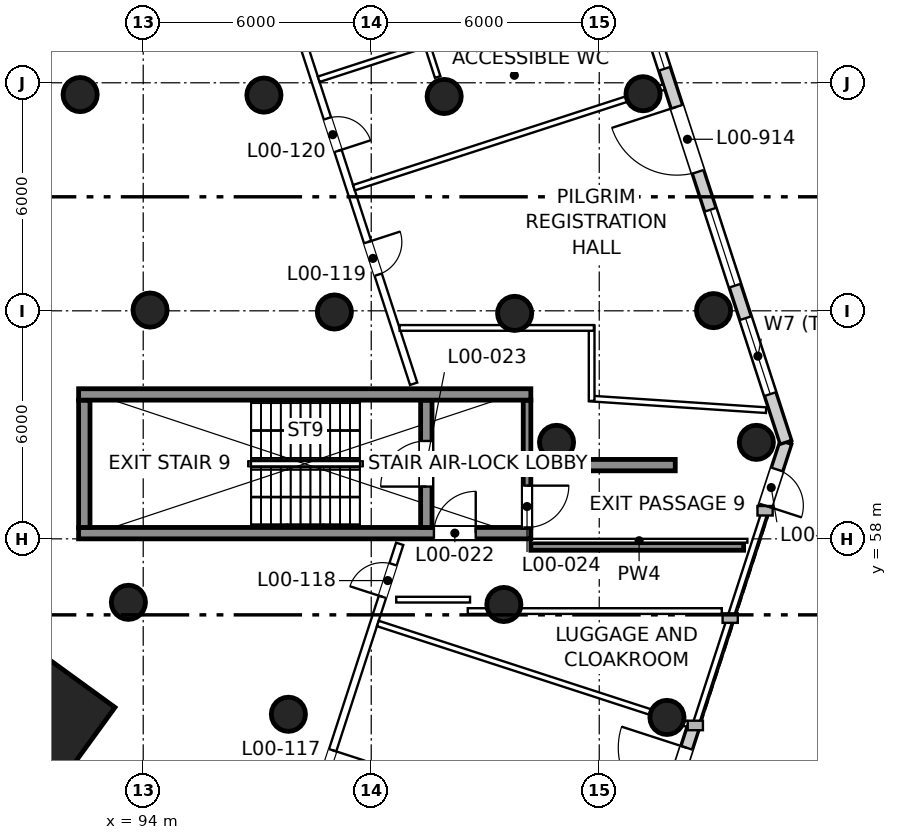
"""IFC4 building model, lengths in metres.
Left out: names, types, materials, properties, quantities, classifications, styles, units other than length and angle.
Written with IfcOpenShell. Run it as: python <this file> out.ifc"""

import sys

from ifc_helpers import new_model, si_unit, direction, frame, frame_2d, origin, origin_2d, place, context, subcontext, project, spatial, rectangle, circle, extrude, element, fill, save


model = new_model("IFC4")
c1 = context("Model", 3, precision=1e-05, world=origin(), true_north=direction((0.0, 1.0)))
c2 = subcontext(c1, "Body", "Model", "MODEL_VIEW")
j1 = project(units=[si_unit("LENGTHUNIT", "METRE"), si_unit("PLANEANGLEUNIT", "RADIAN")], contexts=[c1])
p1 = place(None, origin())
s1 = spatial("IfcSite", under=j1, at=p1, CompositionType="ELEMENT")
p2 = place(p1, origin())
s2 = spatial("IfcBuilding", under=s1, at=p2, CompositionType="ELEMENT")
p3 = place(p2, origin())
s3 = spatial("IfcBuildingStorey", under=s2, at=p3, CompositionType="ELEMENT", Elevation=0.0)
p4 = place(p3, frame((91.58, 53.3, 0.0), z_axis=(0.0, 0.0, 1.0), x_axis=(0.809016994375, -0.587785252292, 0.0)))
e1 = element("IfcColumn", 1, at=p4, inside=s3, PredefinedType="COLUMN", context=c2, shape_type="SweptSolid", body=[
    extrude(rectangle(XDim=2.4, YDim=2.4, at=origin_2d()), origin(), (0.0, 0.0, 1.0), 9.0),
])
for number, where, z_axis, x_axis in (
    (2, (93.61, 56.33, 0.0), (0.0, 0.0, 1.0), (1.0, 0.0, 0.0)),
    (3, (94.18, 64.02, 0.0), (0.0, 0.0, 1.0), (1.0, 0.0, 0.0)),
    (4, (92.34, 69.69, 0.0), (0.0, 0.0, 1.0), (1.0, 0.0, 0.0)),
    (5, (107.782, 53.301, 0.0), (0.0, 0.0, 1.0), (1.0, 0.0, 0.0)),
    (6, (110.134, 60.539, 0.0), (0.0, 0.0, 1.0), (1.0, 0.0, 0.0)),
    (7, (109.008, 64.005, 0.0), (0.0, 0.0, 1.0), (1.0, 0.0, 0.0)),
    (8, (107.153, 69.712, 0.0), (0.0, 0.0, 1.0), (1.0, 0.0, 0.0)),
    (9, (103.49, 56.273, 0.0), (0.0, 0.0, 1.0), (1.0, 0.0, 0.0)),
    (10, (104.876, 60.539, 0.0), (0.0, 0.0, 1.0), (1.0, 0.0, 0.0)),
    (11, (103.774, 63.933, 0.0), (0.0, 0.0, 1.0), (1.0, 0.0, 0.0)),
    (12, (101.919, 69.64, 0.0), (0.0, 0.0, 1.0), (1.0, 0.0, 0.0)),
    (13, (97.82, 53.384, 0.0), (0.0, 0.0, 1.0), (1.0, 0.0, 0.0)),
    (14, (99.03, 63.969, 0.0), (0.0, 0.0, 1.0), (1.0, 0.0, 0.0)),
    (15, (97.176, 69.676, 0.0), (0.0, 0.0, 1.0), (1.0, 0.0, 0.0)),
):
    element("IfcColumn", number, at=place(p3, frame(where, z_axis=z_axis, x_axis=x_axis)), inside=s3, PredefinedType="COLUMN", context=c2, shape_type="SweptSolid", body=[
        extrude(circle(Radius=0.45, at=origin_2d()), origin(), (0.0, 0.0, 1.0), 9.0),
    ])
p5 = place(p3, frame((107.559, 50.219, 0.0), z_axis=(0.0, 0.0, 1.0), x_axis=(0.309065831784, 0.951040646673, 0.0)))
e16 = element("IfcWall", 16, at=p5, inside=s3, PredefinedType="SOLIDWALL", context=c2, shape_type="SweptSolid", body=[
    extrude(rectangle(XDim=3.0, YDim=0.32, at=frame_2d((1.5, 0.0))), origin(), (0.0, 0.0, 1.0), 8.65),
])
p6 = place(p5, frame((0.6, 0.0, 0.0)))
e17 = element("IfcOpeningElement", 17, at=p6, cuts=e16, PredefinedType="OPENING", context=c2, shape_type="SweptSolid", body=[
    extrude(rectangle(XDim=1.8, YDim=2.4, at=frame_2d((0.9, 1.2))), frame((0.0, 0.17, 0.0), z_axis=(0.0, -1.0, 0.0), x_axis=(1.0, 0.0, 0.0)), (0.0, 0.0, 1.0), 0.34),
])
p7 = place(p3, frame((110.34, 58.779, 0.0), z_axis=(0.0, 0.0, 1.0), x_axis=(0.309056246022, 0.951043761766, 0.0)))
e18 = element("IfcWall", 18, at=p7, inside=s3, PredefinedType="SOLIDWALL", context=c2, shape_type="SweptSolid", body=[
    extrude(rectangle(XDim=1.851, YDim=0.32, at=frame_2d((0.925, 0.0))), origin(), (0.0, 0.0, 1.0), 8.65),
])
p8 = place(p7, frame((0.1, 0.0, 0.0)))
e19 = element("IfcOpeningElement", 19, at=p8, cuts=e18, PredefinedType="OPENING", context=c2, shape_type="SweptSolid", body=[
    extrude(rectangle(XDim=1.0, YDim=2.1, at=frame_2d((0.5, 1.05))), frame((0.0, 0.17, 0.0), z_axis=(0.0, -1.0, 0.0), x_axis=(1.0, 0.0, 0.0)), (0.0, 0.0, 1.0), 0.34),
])
p9 = place(p3, frame((110.912, 60.539, 0.0), z_axis=(0.0, 0.0, 1.0), x_axis=(-0.309016476183, 0.951056684666, 0.0)))
e20 = element("IfcWall", 20, at=p9, inside=s3, PredefinedType="SOLIDWALL", context=c2, shape_type="SweptSolid", body=[
    extrude(rectangle(XDim=28.556, YDim=0.32, at=frame_2d((14.278, 0.0))), origin(), (0.0, 0.0, 1.0), 8.65),
])
p10 = place(p9, frame((1.335, 0.0, 0.9)))
e21 = element("IfcOpeningElement", 21, at=p10, cuts=e20, PredefinedType="OPENING", context=c2, shape_type="SweptSolid", body=[
    extrude(rectangle(XDim=2.1, YDim=3.0, at=frame_2d((1.05, 1.5))), frame((0.0, 0.17, 0.0), z_axis=(0.0, -1.0, 0.0), x_axis=(1.0, 0.0, 0.0)), (0.0, 0.0, 1.0), 0.34),
])
p11 = place(p9, frame((4.335, 0.0, 0.9)))
e22 = element("IfcOpeningElement", 22, at=p11, cuts=e20, PredefinedType="OPENING", context=c2, shape_type="SweptSolid", body=[
    extrude(rectangle(XDim=2.1, YDim=3.0, at=frame_2d((1.05, 1.5))), frame((0.0, 0.17, 0.0), z_axis=(0.0, -1.0, 0.0), x_axis=(1.0, 0.0, 0.0)), (0.0, 0.0, 1.0), 0.34),
])
p12 = place(p9, frame((7.485, 0.0, 0.0)))
e23 = element("IfcOpeningElement", 23, at=p12, cuts=e20, PredefinedType="OPENING", context=c2, shape_type="SweptSolid", body=[
    extrude(rectangle(XDim=1.8, YDim=2.4, at=frame_2d((0.9, 1.2))), frame((0.0, 0.17, 0.0), z_axis=(0.0, -1.0, 0.0), x_axis=(1.0, 0.0, 0.0)), (0.0, 0.0, 1.0), 0.34),
])
p13 = place(p9, frame((10.335, 0.0, 0.9)))
e24 = element("IfcOpeningElement", 24, at=p13, cuts=e20, PredefinedType="OPENING", context=c2, shape_type="SweptSolid", body=[
    extrude(rectangle(XDim=2.1, YDim=3.0, at=frame_2d((1.05, 1.5))), frame((0.0, 0.17, 0.0), z_axis=(0.0, -1.0, 0.0), x_axis=(1.0, 0.0, 0.0)), (0.0, 0.0, 1.0), 0.34),
])
p14 = place(p9, frame((13.335, 0.0, 0.9)))
e25 = element("IfcOpeningElement", 25, at=p14, cuts=e20, PredefinedType="OPENING", context=c2, shape_type="SweptSolid", body=[
    extrude(rectangle(XDim=2.1, YDim=3.0, at=frame_2d((1.05, 1.5))), frame((0.0, 0.17, 0.0), z_axis=(0.0, -1.0, 0.0), x_axis=(1.0, 0.0, 0.0)), (0.0, 0.0, 1.0), 0.34),
])
p15 = place(p9, frame((16.335, 0.0, 0.9)))
e26 = element("IfcOpeningElement", 26, at=p15, cuts=e20, PredefinedType="OPENING", context=c2, shape_type="SweptSolid", body=[
    extrude(rectangle(XDim=2.1, YDim=3.0, at=frame_2d((1.05, 1.5))), frame((0.0, 0.17, 0.0), z_axis=(0.0, -1.0, 0.0), x_axis=(1.0, 0.0, 0.0)), (0.0, 0.0, 1.0), 0.34),
])
p16 = place(p9, frame((19.485, 0.0, 0.0)))
e27 = element("IfcOpeningElement", 27, at=p16, cuts=e20, PredefinedType="OPENING", context=c2, shape_type="SweptSolid", body=[
    extrude(rectangle(XDim=1.8, YDim=2.4, at=frame_2d((0.9, 1.2))), frame((0.0, 0.17, 0.0), z_axis=(0.0, -1.0, 0.0), x_axis=(1.0, 0.0, 0.0)), (0.0, 0.0, 1.0), 0.34),
])
p17 = place(p9, frame((22.335, 0.0, 0.9)))
e28 = element("IfcOpeningElement", 28, at=p17, cuts=e20, PredefinedType="OPENING", context=c2, shape_type="SweptSolid", body=[
    extrude(rectangle(XDim=2.1, YDim=3.0, at=frame_2d((1.05, 1.5))), frame((0.0, 0.17, 0.0), z_axis=(0.0, -1.0, 0.0), x_axis=(1.0, 0.0, 0.0)), (0.0, 0.0, 1.0), 0.34),
])
p18 = place(p9, frame((25.335, 0.0, 0.9)))
e29 = element("IfcOpeningElement", 29, at=p18, cuts=e20, PredefinedType="OPENING", context=c2, shape_type="SweptSolid", body=[
    extrude(rectangle(XDim=2.1, YDim=3.0, at=frame_2d((1.05, 1.5))), frame((0.0, 0.17, 0.0), z_axis=(0.0, -1.0, 0.0), x_axis=(1.0, 0.0, 0.0)), (0.0, 0.0, 1.0), 0.34),
])
p19 = place(p3, frame((104.2, 57.8, 0.0), z_axis=(0.0, 0.0, 1.0), x_axis=(1.0, 0.0, 0.0)))
e30 = element("IfcWall", 30, at=p19, inside=s3, PredefinedType="SHEAR", context=c2, shape_type="SweptSolid", body=[
    extrude(rectangle(XDim=5.6, YDim=0.2, at=frame_2d((2.8, 0.0))), origin(), (0.0, 0.0, 1.0), 9.0),
])
p20 = place(p3, frame((104.2, 57.95, 0.0), z_axis=(0.0, 0.0, 1.0), x_axis=(1.0, 0.0, 0.0)))
e31 = element("IfcWall", 31, at=p20, inside=s3, PredefinedType="PARTITIONING", context=c2, shape_type="SweptSolid", body=[
    extrude(rectangle(XDim=5.698, YDim=0.1, at=frame_2d((2.849, 0.0))), origin(), (0.0, 0.0, 1.0), 7.95),
])
p21 = place(p3, frame((92.3, 58.15, 0.0), z_axis=(0.0, 0.0, 1.0), x_axis=(1.0, 0.0, 0.0)))
e32 = element("IfcWall", 32, at=p21, inside=s3, PredefinedType="SHEAR", context=c2, shape_type="SweptSolid", body=[
    extrude(rectangle(XDim=11.9, YDim=0.3, at=frame_2d((5.95, 0.0))), origin(), (0.0, 0.0, 1.0), 9.0),
])
p22 = place(p21, frame((9.35, 0.0, 0.0)))
e33 = element("IfcOpeningElement", 33, at=p22, cuts=e32, PredefinedType="OPENING", context=c2, shape_type="SweptSolid", body=[
    extrude(rectangle(XDim=1.1, YDim=2.1, at=frame_2d((0.55, 1.05))), frame((0.0, 0.16, 0.0), z_axis=(0.0, -1.0, 0.0), x_axis=(1.0, 0.0, 0.0)), (0.0, 0.0, 1.0), 0.32),
])
p23 = place(p3, frame((92.45, 58.3, 0.0), z_axis=(0.0, 0.0, 1.0), x_axis=(0.0, 1.0, 0.0)))
e34 = element("IfcWall", 34, at=p23, inside=s3, PredefinedType="SHEAR", context=c2, shape_type="SweptSolid", body=[
    extrude(rectangle(XDim=3.35, YDim=0.3, at=frame_2d((1.675, 0.0))), origin(), (0.0, 0.0, 1.0), 9.0),
])
p24 = place(p3, frame((101.45, 58.3, 0.0), z_axis=(0.0, 0.0, 1.0), x_axis=(0.0, 1.0, 0.0)))
e35 = element("IfcWall", 35, at=p24, inside=s3, PredefinedType="SHEAR", context=c2, shape_type="SweptSolid", body=[
    extrude(rectangle(XDim=3.35, YDim=0.3, at=frame_2d((1.675, 0.0))), origin(), (0.0, 0.0, 1.0), 9.0),
])
p25 = place(p24, frame((1.075, 0.0, 0.0)))
e36 = element("IfcOpeningElement", 36, at=p25, cuts=e35, PredefinedType="OPENING", context=c2, shape_type="SweptSolid", body=[
    extrude(rectangle(XDim=1.2, YDim=2.1, at=frame_2d((0.6, 1.05))), frame((0.0, 0.16, 0.0), z_axis=(0.0, -1.0, 0.0), x_axis=(1.0, 0.0, 0.0)), (0.0, 0.0, 1.0), 0.32),
])
p26 = place(p3, frame((104.1, 58.3, 0.0), z_axis=(0.0, 0.0, 1.0), x_axis=(0.0, 1.0, 0.0)))
e37 = element("IfcWall", 37, at=p26, inside=s3, PredefinedType="SHEAR", context=c2, shape_type="SweptSolid", body=[
    extrude(rectangle(XDim=1.49, YDim=0.2, at=frame_2d((0.745, 0.0))), origin(), (0.0, 0.0, 1.0), 9.0),
])
p27 = place(p26, origin())
e38 = element("IfcOpeningElement", 38, at=p27, cuts=e37, PredefinedType="OPENING", context=c2, shape_type="SweptSolid", body=[
    extrude(rectangle(XDim=1.1, YDim=2.1, at=frame_2d((0.55, 1.05))), frame((0.0, 0.11, 0.0), z_axis=(0.0, -1.0, 0.0), x_axis=(1.0, 0.0, 0.0)), (0.0, 0.0, 1.0), 0.22),
])
p28 = place(p3, frame((104.0, 59.94, 0.0), z_axis=(0.0, 0.0, 1.0), x_axis=(1.0, 0.0, 0.0)))
e39 = element("IfcWall", 39, at=p28, inside=s3, PredefinedType="SHEAR", context=c2, shape_type="SweptSolid", body=[
    extrude(rectangle(XDim=4.0, YDim=0.3, at=frame_2d((2.0, 0.0))), origin(), (0.0, 0.0, 1.0), 9.0),
])
p29 = place(p3, frame((104.1, 60.09, 0.0), z_axis=(0.0, 0.0, 1.0), x_axis=(0.0, 1.0, 0.0)))
e40 = element("IfcWall", 40, at=p29, inside=s3, PredefinedType="SHEAR", context=c2, shape_type="SweptSolid", body=[
    extrude(rectangle(XDim=1.56, YDim=0.2, at=frame_2d((0.78, 0.0))), origin(), (0.0, 0.0, 1.0), 9.0),
])
p30 = place(p3, frame((92.3, 61.8, 0.0), z_axis=(0.0, 0.0, 1.0), x_axis=(1.0, 0.0, 0.0)))
e41 = element("IfcWall", 41, at=p30, inside=s3, PredefinedType="SHEAR", context=c2, shape_type="SweptSolid", body=[
    extrude(rectangle(XDim=11.9, YDim=0.3, at=frame_2d((5.95, 0.0))), origin(), (0.0, 0.0, 1.0), 9.0),
])
p31 = place(p3, frame((95.641, 78.931, 0.0), z_axis=(0.0, 0.0, 1.0), x_axis=(0.309013160516, -0.951057761983, 0.0)))
e42 = element("IfcWall", 42, at=p31, inside=s3, PredefinedType="PARTITIONING", context=c2, shape_type="SweptSolid", body=[
    extrude(rectangle(XDim=17.717, YDim=0.2, at=frame_2d((8.859, 0.0))), origin(), (0.0, 0.0, 1.0), 8.65),
])
p32 = place(p31, frame((13.799, 0.0, 0.0)))
e43 = element("IfcOpeningElement", 43, at=p32, cuts=e42, PredefinedType="OPENING", context=c2, shape_type="SweptSolid", body=[
    extrude(rectangle(XDim=0.9, YDim=2.1, at=frame_2d((0.45, 1.05))), frame((0.0, 0.11, 0.0), z_axis=(0.0, -1.0, 0.0), x_axis=(1.0, 0.0, 0.0)), (0.0, 0.0, 1.0), 0.22),
])
p33 = place(p31, frame((10.375, 0.0, 0.0)))
e44 = element("IfcOpeningElement", 44, at=p33, cuts=e42, PredefinedType="OPENING", context=c2, shape_type="SweptSolid", body=[
    extrude(rectangle(XDim=0.9, YDim=2.1, at=frame_2d((0.45, 1.05))), frame((0.0, 0.11, 0.0), z_axis=(0.0, -1.0, 0.0), x_axis=(1.0, 0.0, 0.0)), (0.0, 0.0, 1.0), 0.22),
])
p34 = place(p31, frame((5.875, 0.0, 0.0)))
e45 = element("IfcOpeningElement", 45, at=p34, cuts=e42, PredefinedType="OPENING", context=c2, shape_type="SweptSolid", body=[
    extrude(rectangle(XDim=0.9, YDim=2.1, at=frame_2d((0.45, 1.05))), frame((0.0, 0.11, 0.0), z_axis=(0.0, -1.0, 0.0), x_axis=(1.0, 0.0, 0.0)), (0.0, 0.0, 1.0), 0.22),
])
p35 = place(p31, frame((1.492, 0.0, 0.0)))
e46 = element("IfcOpeningElement", 46, at=p35, cuts=e42, PredefinedType="OPENING", context=c2, shape_type="SweptSolid", body=[
    extrude(rectangle(XDim=0.9, YDim=2.1, at=frame_2d((0.45, 1.05))), frame((0.0, 0.11, 0.0), z_axis=(0.0, -1.0, 0.0), x_axis=(1.0, 0.0, 0.0)), (0.0, 0.0, 1.0), 0.22),
])
p36 = place(p3, frame((100.749, 57.869, 0.0), z_axis=(0.0, 0.0, 1.0), x_axis=(-0.309015685068, -0.951056941714, 0.0)))
e47 = element("IfcWall", 47, at=p36, inside=s3, PredefinedType="PARTITIONING", context=c2, shape_type="SweptSolid", body=[
    extrude(rectangle(XDim=10.117, YDim=0.2, at=frame_2d((5.059, 0.0))), origin(), (0.0, 0.0, 1.0), 8.65),
])
p37 = place(p36, frame((5.711, 0.0, 0.0)))
e48 = element("IfcOpeningElement", 48, at=p37, cuts=e47, PredefinedType="OPENING", context=c2, shape_type="SweptSolid", body=[
    extrude(rectangle(XDim=0.9, YDim=2.1, at=frame_2d((0.45, 1.05))), frame((0.0, 0.11, 0.0), z_axis=(0.0, -1.0, 0.0), x_axis=(1.0, 0.0, 0.0)), (0.0, 0.0, 1.0), 0.22),
])
p38 = place(p36, frame((0.567, 0.0, 0.0)))
e49 = element("IfcOpeningElement", 49, at=p38, cuts=e47, PredefinedType="OPENING", context=c2, shape_type="SweptSolid", body=[
    extrude(rectangle(XDim=0.9, YDim=2.1, at=frame_2d((0.45, 1.05))), frame((0.0, 0.11, 0.0), z_axis=(0.0, -1.0, 0.0), x_axis=(1.0, 0.0, 0.0)), (0.0, 0.0, 1.0), 0.22),
])
p39 = place(p3, frame((108.333, 53.122, 0.0), z_axis=(0.0, 0.0, 1.0), x_axis=(-0.951054768527, 0.309022373402, 0.0)))
e50 = element("IfcWall", 50, at=p39, inside=s3, PredefinedType="PARTITIONING", context=c2, shape_type="SweptSolid", body=[
    extrude(rectangle(XDim=8.58, YDim=0.15, at=frame_2d((4.29, 0.0))), origin(), (0.0, 0.0, 1.0), 7.95),
])
for number, where, z_axis, x_axis in (
    (51, (107.705, 69.891, 0.0), (0.0, 0.0, 1.0), (-0.951, -0.309, 0.0)),
    (52, (106.778, 72.744, 0.0), (0.0, 0.0, 1.0), (-0.951, -0.309, 0.0)),
):
    element("IfcWall", number, at=place(p3, frame(where, z_axis=z_axis, x_axis=x_axis)), inside=s3, PredefinedType="PARTITIONING", context=c2, shape_type="SweptSolid", body=[
        extrude(rectangle(XDim=8.58, YDim=0.15, at=frame_2d((4.29, 0.0))), origin(), (0.0, 0.0, 1.0), 7.95),
    ])
p40 = place(p3, frame((101.748, 70.152, 0.0), z_axis=(0.0, 0.0, 1.0), x_axis=(-0.309033234433, 0.951051239427, 0.0)))
e53 = element("IfcWall", 53, at=p40, inside=s3, PredefinedType="PARTITIONING", context=c2, shape_type="SweptSolid", body=[
    extrude(rectangle(XDim=0.836, YDim=0.15, at=frame_2d((0.418, 0.0))), origin(), (0.0, 0.0, 1.0), 7.95),
])
p41 = place(p3, frame((110.39, 61.386, 0.0), z_axis=(0.0, 0.0, 1.0), x_axis=(-0.997812424504, 0.066108740011, 0.0)))
e54 = element("IfcWall", 54, at=p41, inside=s3, PredefinedType="PARTITIONING", context=c2, shape_type="SweptSolid", body=[
    extrude(rectangle(XDim=4.661, YDim=0.15, at=frame_2d((2.33, 0.0))), origin(), (0.0, 0.0, 1.0), 7.95),
])
p42 = place(p3, frame((105.8, 61.63, 0.0), z_axis=(0.0, 0.0, 1.0), x_axis=(0.0, 1.0, 0.0)))
e55 = element("IfcWall", 55, at=p42, inside=s3, PredefinedType="PARTITIONING", context=c2, shape_type="SweptSolid", body=[
    extrude(rectangle(XDim=1.98, YDim=0.15, at=frame_2d((0.99, 0.0))), origin(), (0.0, 0.0, 1.0), 8.65),
])
p43 = place(p3, frame((105.86, 63.55, 0.0), z_axis=(0.0, 0.0, 1.0), x_axis=(-1.0, 0.0, 0.0)))
e56 = element("IfcWall", 56, at=p43, inside=s3, PredefinedType="PARTITIONING", context=c2, shape_type="SweptSolid", body=[
    extrude(rectangle(XDim=5.113, YDim=0.15, at=frame_2d((2.557, 0.0))), origin(), (0.0, 0.0, 1.0), 8.65),
])
p44 = place(p3, frame((102.54, 56.1, 0.0), z_axis=(0.0, 0.0, 1.0), x_axis=(1.0, 0.0, 0.0)))
e57 = element("IfcWall", 57, at=p44, inside=s3, PredefinedType="PARTITIONING", context=c2, shape_type="SweptSolid", body=[
    extrude(rectangle(XDim=6.685, YDim=0.15, at=frame_2d((3.342, 0.0))), origin(), (0.0, 0.0, 1.0), 7.95),
])
p45 = place(p3, frame((100.658, 56.4, 0.0), z_axis=(0.0, 0.0, 1.0), x_axis=(1.0, 0.0, 0.0)))
e58 = element("IfcWall", 58, at=p45, inside=s3, PredefinedType="PARTITIONING", context=c2, shape_type="SweptSolid", body=[
    extrude(rectangle(XDim=1.942, YDim=0.15, at=frame_2d((0.971, 0.0))), origin(), (0.0, 0.0, 1.0), 8.65),
])
p46 = place(p6, origin())
e59 = element("IfcDoor", 59, at=p46, inside=s3, OperationType="DOUBLE_DOOR_DOUBLE_SWING", PredefinedType="DOOR", context=c2, shape_type="SweptSolid", body=[
    extrude(rectangle(XDim=1.8, YDim=2.4, at=frame_2d((0.9, 1.2))), frame((0.0, 0.04, 0.0), z_axis=(0.0, -1.0, 0.0), x_axis=(1.0, 0.0, 0.0)), (0.0, 0.0, 1.0), 0.05),
])
fill(e17, e59)
p47 = place(p10, origin())
e60 = element("IfcWindow", 60, at=p47, inside=s3, PartitioningType="SINGLE_PANEL", PredefinedType="WINDOW", context=c2, shape_type="SweptSolid", body=[
    extrude(rectangle(XDim=2.1, YDim=3.0, at=frame_2d((1.05, 1.5))), frame((0.0, 0.07, 0.0), z_axis=(0.0, -1.0, 0.0), x_axis=(1.0, 0.0, 0.0)), (0.0, 0.0, 1.0), 0.06),
])
fill(e21, e60)
p48 = place(p11, origin())
e61 = element("IfcWindow", 61, at=p48, inside=s3, PartitioningType="SINGLE_PANEL", PredefinedType="WINDOW", context=c2, shape_type="SweptSolid", body=[
    extrude(rectangle(XDim=2.1, YDim=3.0, at=frame_2d((1.05, 1.5))), frame((0.0, 0.07, 0.0), z_axis=(0.0, -1.0, 0.0), x_axis=(1.0, 0.0, 0.0)), (0.0, 0.0, 1.0), 0.06),
])
fill(e22, e61)
p49 = place(p12, origin())
e62 = element("IfcDoor", 62, at=p49, inside=s3, OperationType="DOUBLE_DOOR_DOUBLE_SWING", PredefinedType="DOOR", context=c2, shape_type="SweptSolid", body=[
    extrude(rectangle(XDim=1.8, YDim=2.4, at=frame_2d((0.9, 1.2))), frame((0.0, 0.04, 0.0), z_axis=(0.0, -1.0, 0.0), x_axis=(1.0, 0.0, 0.0)), (0.0, 0.0, 1.0), 0.05),
])
fill(e23, e62)
p50 = place(p13, origin())
e63 = element("IfcWindow", 63, at=p50, inside=s3, PartitioningType="SINGLE_PANEL", PredefinedType="WINDOW", context=c2, shape_type="SweptSolid", body=[
    extrude(rectangle(XDim=2.1, YDim=3.0, at=frame_2d((1.05, 1.5))), frame((0.0, 0.07, 0.0), z_axis=(0.0, -1.0, 0.0), x_axis=(1.0, 0.0, 0.0)), (0.0, 0.0, 1.0), 0.06),
])
fill(e24, e63)
p51 = place(p8, frame((1.0, 0.0, 0.0), z_axis=(0.0, 0.0, 1.0), x_axis=(-1.0, 0.0, 0.0)))
e64 = element("IfcDoor", 64, at=p51, inside=s3, OperationType="SINGLE_SWING_RIGHT", PredefinedType="DOOR", context=c2, shape_type="SweptSolid", body=[
    extrude(rectangle(XDim=1.0, YDim=2.1, at=frame_2d((0.5, 1.05))), frame((0.0, 0.04, 0.0), z_axis=(0.0, -1.0, 0.0), x_axis=(1.0, 0.0, 0.0)), (0.0, 0.0, 1.0), 0.05),
])
fill(e19, e64)
p52 = place(p22, origin())
e65 = element("IfcDoor", 65, at=p52, inside=s3, OperationType="SINGLE_SWING_RIGHT", PredefinedType="DOOR", context=c2, shape_type="SweptSolid", body=[
    extrude(rectangle(XDim=1.1, YDim=2.1, at=frame_2d((0.55, 1.05))), frame((0.0, 0.025, 0.0), z_axis=(0.0, -1.0, 0.0), x_axis=(1.0, 0.0, 0.0)), (0.0, 0.0, 1.0), 0.05),
])
fill(e33, e65)
p53 = place(p25, origin())
e66 = element("IfcDoor", 66, at=p53, inside=s3, OperationType="SINGLE_SWING_LEFT", PredefinedType="DOOR", context=c2, shape_type="SweptSolid", body=[
    extrude(rectangle(XDim=1.2, YDim=2.1, at=frame_2d((0.6, 1.05))), frame((0.0, 0.025, 0.0), z_axis=(0.0, -1.0, 0.0), x_axis=(1.0, 0.0, 0.0)), (0.0, 0.0, 1.0), 0.05),
])
fill(e36, e66)
p54 = place(p27, frame((1.1, 0.0, 0.0), z_axis=(0.0, 0.0, 1.0), x_axis=(-1.0, 0.0, 0.0)))
e67 = element("IfcDoor", 67, at=p54, inside=s3, OperationType="SINGLE_SWING_LEFT", PredefinedType="DOOR", context=c2, shape_type="SweptSolid", body=[
    extrude(rectangle(XDim=1.1, YDim=2.1, at=frame_2d((0.55, 1.05))), frame((0.0, 0.025, 0.0), z_axis=(0.0, -1.0, 0.0), x_axis=(1.0, 0.0, 0.0)), (0.0, 0.0, 1.0), 0.05),
])
fill(e38, e67)
p55 = place(p37, origin())
e68 = element("IfcDoor", 68, at=p55, inside=s3, OperationType="SINGLE_SWING_LEFT", PredefinedType="DOOR", context=c2, shape_type="SweptSolid", body=[
    extrude(rectangle(XDim=0.9, YDim=2.1, at=frame_2d((0.45, 1.05))), frame((0.0, 0.025, 0.0), z_axis=(0.0, -1.0, 0.0), x_axis=(1.0, 0.0, 0.0)), (0.0, 0.0, 1.0), 0.05),
])
fill(e48, e68)
p56 = place(p38, frame((0.9, 0.0, 0.0), z_axis=(0.0, 0.0, 1.0), x_axis=(-1.0, 0.0, 0.0)))
e69 = element("IfcDoor", 69, at=p56, inside=s3, OperationType="SINGLE_SWING_LEFT", PredefinedType="DOOR", context=c2, shape_type="SweptSolid", body=[
    extrude(rectangle(XDim=0.9, YDim=2.1, at=frame_2d((0.45, 1.05))), frame((0.0, 0.025, 0.0), z_axis=(0.0, -1.0, 0.0), x_axis=(1.0, 0.0, 0.0)), (0.0, 0.0, 1.0), 0.05),
])
fill(e49, e69)
p57 = place(p32, origin())
e70 = element("IfcDoor", 70, at=p57, inside=s3, OperationType="SINGLE_SWING_LEFT", PredefinedType="DOOR", context=c2, shape_type="SweptSolid", body=[
    extrude(rectangle(XDim=0.9, YDim=2.1, at=frame_2d((0.45, 1.05))), frame((0.0, 0.025, 0.0), z_axis=(0.0, -1.0, 0.0), x_axis=(1.0, 0.0, 0.0)), (0.0, 0.0, 1.0), 0.05),
])
fill(e43, e70)
p58 = place(p33, origin())
e71 = element("IfcDoor", 71, at=p58, inside=s3, OperationType="SINGLE_SWING_RIGHT", PredefinedType="DOOR", context=c2, shape_type="SweptSolid", body=[
    extrude(rectangle(XDim=0.9, YDim=2.1, at=frame_2d((0.45, 1.05))), frame((0.0, 0.025, 0.0), z_axis=(0.0, -1.0, 0.0), x_axis=(1.0, 0.0, 0.0)), (0.0, 0.0, 1.0), 0.05),
])
fill(e44, e71)
save(model, sys.argv[1])
